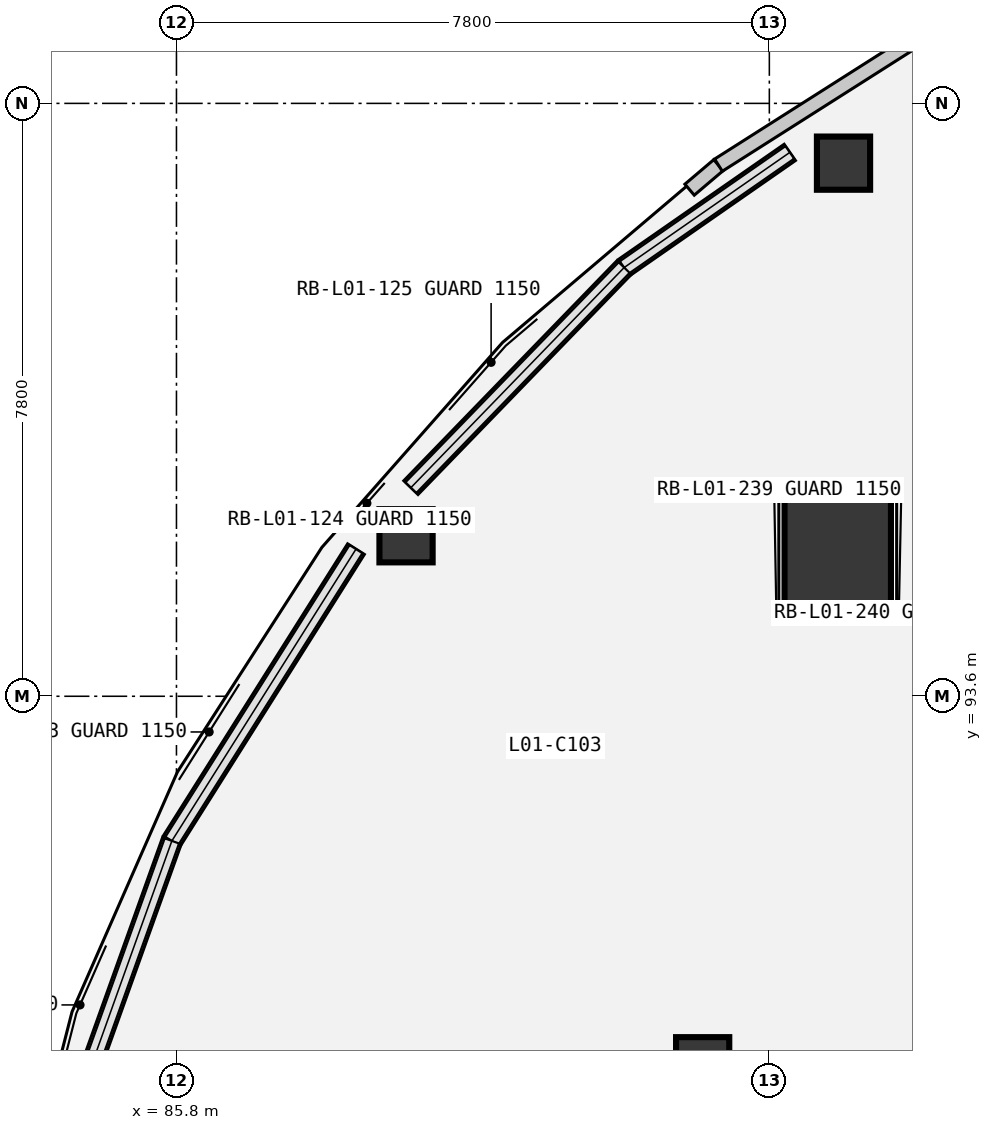
"""IFC4 building model, lengths in metres.
Left out: names, types, materials, properties, quantities, classifications, styles, units other than length and angle.
Written with IfcOpenShell. Run it as: python <this file> out.ifc"""

import sys

from ifc_helpers import new_model, si_unit, direction, frame, frame_2d, origin, origin_2d, place, context, subcontext, project, spatial, rectangle, extrude, element, save


model = new_model("IFC4")
c1 = context("Model", 3, precision=1e-05, world=origin(), true_north=direction((0.0, 1.0)))
c2 = subcontext(c1, "Body", "Model", "MODEL_VIEW")
j1 = project(units=[si_unit("LENGTHUNIT", "METRE"), si_unit("PLANEANGLEUNIT", "RADIAN")], contexts=[c1])
p1 = place(None, origin())
s1 = spatial("IfcSite", under=j1, at=p1, CompositionType="ELEMENT")
p2 = place(p1, origin())
s2 = spatial("IfcBuilding", under=s1, at=p2, CompositionType="ELEMENT")
p3 = place(p2, frame((0.0, 0.0, 5.4)))
s3 = spatial("IfcBuildingStorey", under=s2, at=p3, CompositionType="ELEMENT", Elevation=5.4)
p4 = place(p3, frame((94.5, 95.5, 0.0), z_axis=(0.0, 0.0, 1.0), x_axis=(1.0, 0.0, 0.0)))
e1 = element("IfcColumn", 1, at=p4, inside=s3, PredefinedType="COLUMN", context=c2, shape_type="SweptSolid", body=[
    extrude(rectangle(XDim=1.4, YDim=1.4, at=origin_2d()), origin(), (0.0, 0.0, 1.0), 4.8),
])
for number, where, z_axis, x_axis in (
    (2, (94.576, 100.614, 0.0), (0.0, 0.0, 1.0), (1.0, 0.0, 0.0)),
    (3, (88.82, 95.711, 0.0), (0.0, 0.0, 1.0), (1.0, 0.0, 0.0)),
    (4, (92.723, 88.765, 0.0), (0.0, 0.0, 1.0), (1.0, 0.0, 0.0)),
):
    element("IfcColumn", number, at=place(p3, frame(where, z_axis=z_axis, x_axis=x_axis)), inside=s3, PredefinedType="COLUMN", context=c2, shape_type="SweptSolid", body=[
        extrude(rectangle(XDim=0.7, YDim=0.7, at=origin_2d()), origin(), (0.0, 0.0, 1.0), 4.8),
    ])
p5 = place(p3, frame((93.869, 100.755, 0.0), z_axis=(0.0, 0.0, 1.0), x_axis=(-0.821107669254, -0.570773331098, 0.0)))
e5 = element("IfcWall", 5, at=p5, inside=s3, PredefinedType="SOLIDWALL", context=c2, shape_type="SweptSolid", body=[
    extrude(rectangle(XDim=2.654, YDim=0.26, at=frame_2d((1.327, 0.0))), origin(), (0.0, 0.0, 1.0), 1.02),
])
p6 = place(p3, frame((91.69, 99.24, 0.0), z_axis=(0.0, 0.0, 1.0), x_axis=(-0.69587527134, -0.718162660361, 0.0)))
e6 = element("IfcWall", 6, at=p6, inside=s3, PredefinedType="SOLIDWALL", context=c2, shape_type="SweptSolid", body=[
    extrude(rectangle(XDim=4.031, YDim=0.26, at=frame_2d((2.016, 0.0))), origin(), (0.0, 0.0, 1.0), 1.02),
])
p7 = place(p3, frame((88.162, 95.536, 0.0), z_axis=(0.0, 0.0, 1.0), x_axis=(-0.533697490397, -0.845675463014, 0.0)))
e7 = element("IfcWall", 7, at=p7, inside=s3, PredefinedType="SOLIDWALL", context=c2, shape_type="SweptSolid", body=[
    extrude(rectangle(XDim=4.539, YDim=0.26, at=frame_2d((2.27, 0.0))), origin(), (0.0, 0.0, 1.0), 1.02),
])
p8 = place(p3, frame((85.74, 91.698, 0.0), z_axis=(0.0, 0.0, 1.0), x_axis=(-0.337144107884, -0.941453052743, 0.0)))
e8 = element("IfcWall", 8, at=p8, inside=s3, PredefinedType="SOLIDWALL", context=c2, shape_type="SweptSolid", body=[
    extrude(rectangle(XDim=4.633, YDim=0.26, at=frame_2d((2.316, 0.0))), origin(), (0.0, 0.0, 1.0), 1.02),
])
p9 = place(p3, frame((92.551, 100.265, 0.0), z_axis=(0.0, 0.0, 1.0), x_axis=(0.76228952154, 0.647236189772, 0.0)))
e9 = element("IfcWall", 9, at=p9, inside=s3, PredefinedType="PARAPET", context=c2, shape_type="SweptSolid", body=[
    extrude(rectangle(XDim=0.499, YDim=0.19, at=frame_2d((0.25, 0.0))), origin(), (0.0, 0.0, 1.0), 1.12),
])
p10 = place(p3, frame((92.931, 100.587, 0.0), z_axis=(0.0, 0.0, 1.0), x_axis=(0.844012783406, 0.536323056979, 0.0)))
e10 = element("IfcWall", 10, at=p10, inside=s3, PredefinedType="PARAPET", context=c2, shape_type="SweptSolid", body=[
    extrude(rectangle(XDim=3.06, YDim=0.19, at=frame_2d((1.53, 0.0))), origin(), (0.0, 0.0, 1.0), 1.12),
])
save(model, sys.argv[1])
